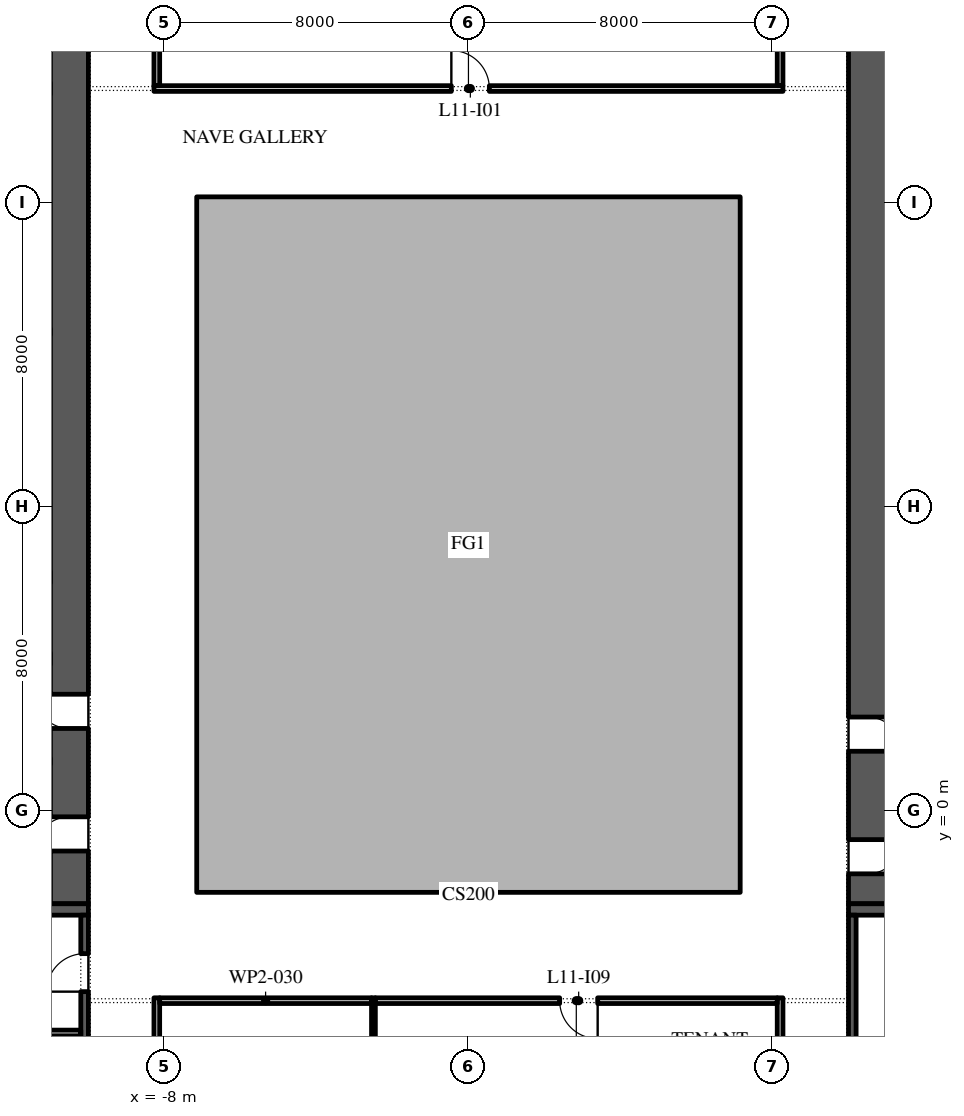
"""IFC4 building model, lengths in metres.
Left out: names, types, materials, properties, quantities, classifications, styles, units other than length and angle.
Written with IfcOpenShell. Run it as: python <this file> out.ifc"""

import sys

from ifc_helpers import new_model, si_unit, direction, frame, frame_2d, origin, place, context, subcontext, project, spatial, polyline, rectangle, outline, extrude, element, fill, save


model = new_model("IFC4")
c1 = context("Model", 3, precision=1e-05, world=origin(), true_north=direction((0.0, 1.0)))
c2 = subcontext(c1, "Body", "Model", "MODEL_VIEW")
j1 = project(units=[si_unit("LENGTHUNIT", "METRE"), si_unit("PLANEANGLEUNIT", "RADIAN")], contexts=[c1])
p1 = place(None, origin())
s1 = spatial("IfcSite", under=j1, at=p1, CompositionType="ELEMENT")
p2 = place(p1, origin())
s2 = spatial("IfcBuilding", under=s1, at=p2, CompositionType="ELEMENT")
p3 = place(p2, frame((0.0, 0.0, 56.4)))
s3 = spatial("IfcBuildingStorey", under=s2, at=p3, CompositionType="ELEMENT", Elevation=56.4)
p4 = place(p3, origin())
e1 = element("IfcWall", 1, at=p4, inside=s3, PredefinedType="STANDARD", context=c2, shape_type="SweptSolid", body=[
    extrude(outline(polyline([(-7.15, -2.15), (7.15, -2.15), (7.15, 16.15), (-7.15, 16.15), (-7.15, -2.15)]), holes=[polyline([(-7.0, -2.0), (-7.0, 16.0), (7.0, 16.0), (7.0, -2.0), (-7.0, -2.0)])]), origin(), (0.0, 0.0, 1.0), 4.0),
])
p5 = place(p3, frame((-10.5, -2.45, 0.0), z_axis=(0.0, 0.0, 1.0), x_axis=(0.0, 1.0, 0.0)))
e2 = element("IfcWall", 2, at=p5, inside=s3, PredefinedType="SHEAR", context=c2, shape_type="SweptSolid", body=[
    extrude(rectangle(XDim=27.9, YDim=1.0, at=frame_2d((13.95, 0.0))), origin(), (0.0, 0.0, 1.0), 4.0),
])
p6 = place(p5, frame((23.65, 0.0, 0.0)))
e3 = element("IfcOpeningElement", 3, at=p6, cuts=e2, PredefinedType="OPENING", context=c2, shape_type="SweptSolid", body=[
    extrude(rectangle(XDim=2.4, YDim=2.1, at=frame_2d((1.2, 1.05))), frame((0.0, 0.51, 0.0), z_axis=(0.0, -1.0, 0.0), x_axis=(1.0, 0.0, 0.0)), (0.0, 0.0, 1.0), 1.02),
])
p7 = place(p5, frame((1.387, 0.0, 0.0)))
e4 = element("IfcOpeningElement", 4, at=p7, cuts=e2, PredefinedType="OPENING", context=c2, shape_type="SweptSolid", body=[
    extrude(rectangle(XDim=0.9, YDim=2.1, at=frame_2d((0.45, 1.05))), frame((0.0, 0.51, 0.0), z_axis=(0.0, -1.0, 0.0), x_axis=(1.0, 0.0, 0.0)), (0.0, 0.0, 1.0), 1.02),
])
p8 = place(p5, frame((4.613, 0.0, 0.0)))
e5 = element("IfcOpeningElement", 5, at=p8, cuts=e2, PredefinedType="OPENING", context=c2, shape_type="SweptSolid", body=[
    extrude(rectangle(XDim=0.9, YDim=2.1, at=frame_2d((0.45, 1.05))), frame((0.0, 0.51, 0.0), z_axis=(0.0, -1.0, 0.0), x_axis=(1.0, 0.0, 0.0)), (0.0, 0.0, 1.0), 1.02),
])
p9 = place(p3, frame((-22.0, -2.6, 0.0), z_axis=(0.0, 0.0, 1.0), x_axis=(1.0, 0.0, 0.0)))
e6 = element("IfcWall", 6, at=p9, inside=s3, PredefinedType="SHEAR", context=c2, shape_type="SweptSolid", body=[
    extrude(rectangle(XDim=12.0, YDim=0.3, at=frame_2d((6.0, 0.0))), origin(), (0.0, 0.0, 1.0), 4.0),
])
p10 = place(p3, frame((-10.1, -15.8, 0.0), z_axis=(0.0, 0.0, 1.0), x_axis=(0.0, 1.0, 0.0)))
e7 = element("IfcWall", 7, at=p10, inside=s3, PredefinedType="SHEAR", context=c2, shape_type="SweptSolid", body=[
    extrude(rectangle(XDim=13.05, YDim=0.2, at=frame_2d((6.525, 0.0))), origin(), (0.0, 0.0, 1.0), 4.0),
])
p11 = place(p10, frame((4.488, 0.0, 0.0)))
e8 = element("IfcOpeningElement", 8, at=p11, cuts=e7, PredefinedType="OPENING", context=c2, shape_type="SweptSolid", body=[
    extrude(rectangle(XDim=0.9, YDim=2.1, at=frame_2d((0.45, 1.05))), frame((0.0, 0.11, 0.0), z_axis=(0.0, -1.0, 0.0), x_axis=(1.0, 0.0, 0.0)), (0.0, 0.0, 1.0), 0.22),
])
p12 = place(p10, frame((11.038, 0.0, 0.0)))
e9 = element("IfcOpeningElement", 9, at=p12, cuts=e7, PredefinedType="OPENING", context=c2, shape_type="SweptSolid", body=[
    extrude(rectangle(XDim=1.0, YDim=2.1, at=frame_2d((0.5, 1.05))), frame((0.0, 0.11, 0.0), z_axis=(0.0, -1.0, 0.0), x_axis=(1.0, 0.0, 0.0)), (0.0, 0.0, 1.0), 0.22),
])
p13 = place(p3, frame((-21.8, -5.85, 0.0), z_axis=(0.0, 0.0, 1.0), x_axis=(1.0, 0.0, 0.0)))
e10 = element("IfcWall", 10, at=p13, inside=s3, PredefinedType="PARTITIONING", context=c2, shape_type="SweptSolid", body=[
    extrude(rectangle(XDim=11.6, YDim=0.15, at=frame_2d((5.8, 0.0))), origin(), (0.0, 0.0, 1.0), 4.0),
])
p14 = place(p3, frame((10.5, -2.45, 0.0), z_axis=(0.0, 0.0, 1.0), x_axis=(0.0, 1.0, 0.0)))
e11 = element("IfcWall", 11, at=p14, inside=s3, PredefinedType="SHEAR", context=c2, shape_type="SweptSolid", body=[
    extrude(rectangle(XDim=27.9, YDim=1.0, at=frame_2d((13.95, 0.0))), origin(), (0.0, 0.0, 1.0), 4.0),
])
p15 = place(p14, frame((23.65, 0.0, 0.0)))
e12 = element("IfcOpeningElement", 12, at=p15, cuts=e11, PredefinedType="OPENING", context=c2, shape_type="SweptSolid", body=[
    extrude(rectangle(XDim=2.4, YDim=2.1, at=frame_2d((1.2, 1.05))), frame((0.0, 0.51, 0.0), z_axis=(0.0, -1.0, 0.0), x_axis=(1.0, 0.0, 0.0)), (0.0, 0.0, 1.0), 1.02),
])
p16 = place(p14, frame((0.788, 0.0, 0.0)))
e13 = element("IfcOpeningElement", 13, at=p16, cuts=e11, PredefinedType="OPENING", context=c2, shape_type="SweptSolid", body=[
    extrude(rectangle(XDim=0.9, YDim=2.1, at=frame_2d((0.45, 1.05))), frame((0.0, 0.51, 0.0), z_axis=(0.0, -1.0, 0.0), x_axis=(1.0, 0.0, 0.0)), (0.0, 0.0, 1.0), 1.02),
])
p17 = place(p14, frame((4.012, 0.0, 0.0)))
e14 = element("IfcOpeningElement", 14, at=p17, cuts=e11, PredefinedType="OPENING", context=c2, shape_type="SweptSolid", body=[
    extrude(rectangle(XDim=0.9, YDim=2.1, at=frame_2d((0.45, 1.05))), frame((0.0, 0.51, 0.0), z_axis=(0.0, -1.0, 0.0), x_axis=(1.0, 0.0, 0.0)), (0.0, 0.0, 1.0), 1.02),
])
p18 = place(p3, frame((10.0, -2.6, 0.0), z_axis=(0.0, 0.0, 1.0), x_axis=(1.0, 0.0, 0.0)))
e15 = element("IfcWall", 15, at=p18, inside=s3, PredefinedType="SHEAR", context=c2, shape_type="SweptSolid", body=[
    extrude(rectangle(XDim=12.0, YDim=0.3, at=frame_2d((6.0, 0.0))), origin(), (0.0, 0.0, 1.0), 4.0),
])
p19 = place(p3, frame((10.1, -15.8, 0.0), z_axis=(0.0, 0.0, 1.0), x_axis=(0.0, 1.0, 0.0)))
e16 = element("IfcWall", 16, at=p19, inside=s3, PredefinedType="SHEAR", context=c2, shape_type="SweptSolid", body=[
    extrude(rectangle(XDim=13.05, YDim=0.2, at=frame_2d((6.525, 0.0))), origin(), (0.0, 0.0, 1.0), 4.0),
])
p20 = place(p19, frame((6.075, 0.0, 0.0)))
e17 = element("IfcOpeningElement", 17, at=p20, cuts=e16, PredefinedType="OPENING", context=c2, shape_type="SweptSolid", body=[
    extrude(rectangle(XDim=0.9, YDim=2.1, at=frame_2d((0.45, 1.05))), frame((0.0, 0.11, 0.0), z_axis=(0.0, -1.0, 0.0), x_axis=(1.0, 0.0, 0.0)), (0.0, 0.0, 1.0), 0.22),
])
p21 = place(p3, frame((-8.2, -4.925, 0.0), z_axis=(0.0, 0.0, 1.0), x_axis=(0.0, -1.0, 0.0)))
e18 = element("IfcWall", 18, at=p21, inside=s3, PredefinedType="PARTITIONING", context=c2, shape_type="SweptSolid", body=[
    extrude(rectangle(XDim=12.415, YDim=0.15, at=frame_2d((6.208, 0.0))), origin(), (0.0, 0.0, 1.0), 4.0),
])
p22 = place(p21, frame((5.715, 0.0, 0.0)))
e19 = element("IfcOpeningElement", 19, at=p22, cuts=e18, PredefinedType="OPENING", context=c2, shape_type="SweptSolid", body=[
    extrude(rectangle(XDim=1.0, YDim=2.1, at=frame_2d((0.5, 1.05))), frame((0.0, 0.085, 0.0), z_axis=(0.0, -1.0, 0.0), x_axis=(1.0, 0.0, 0.0)), (0.0, 0.0, 1.0), 0.17),
])
p23 = place(p3, frame((-8.275, 19.0, 0.0), z_axis=(0.0, 0.0, 1.0), x_axis=(1.0, 0.0, 0.0)))
e20 = element("IfcWall", 20, at=p23, inside=s3, PredefinedType="PARTITIONING", context=c2, shape_type="SweptSolid", body=[
    extrude(rectangle(XDim=16.55, YDim=0.15, at=frame_2d((8.275, 0.0))), origin(), (0.0, 0.0, 1.0), 4.0),
])
p24 = place(p23, frame((7.825, 0.0, 0.0)))
e21 = element("IfcOpeningElement", 21, at=p24, cuts=e20, PredefinedType="OPENING", context=c2, shape_type="SweptSolid", body=[
    extrude(rectangle(XDim=1.0, YDim=2.1, at=frame_2d((0.5, 1.05))), frame((0.0, 0.085, 0.0), z_axis=(0.0, -1.0, 0.0), x_axis=(1.0, 0.0, 0.0)), (0.0, 0.0, 1.0), 0.17),
])
p25 = place(p3, frame((-8.2, 25.45, 0.0), z_axis=(0.0, 0.0, 1.0), x_axis=(0.0, -1.0, 0.0)))
e22 = element("IfcWall", 22, at=p25, inside=s3, PredefinedType="PARTITIONING", context=c2, shape_type="SweptSolid", body=[
    extrude(rectangle(XDim=6.375, YDim=0.15, at=frame_2d((3.188, 0.0))), origin(), (0.0, 0.0, 1.0), 4.0),
])
p26 = place(p3, frame((-2.5, -8.45, 0.0), z_axis=(0.0, 0.0, 1.0), x_axis=(0.0, 1.0, 0.0)))
e23 = element("IfcWall", 23, at=p26, inside=s3, PredefinedType="PARTITIONING", context=c2, shape_type="SweptSolid", body=[
    extrude(rectangle(XDim=3.525, YDim=0.1, at=frame_2d((1.762, 0.0))), origin(), (0.0, 0.0, 1.0), 4.0),
])
p27 = place(p3, frame((-2.55, -5.0, 0.0), z_axis=(0.0, 0.0, 1.0), x_axis=(-1.0, 0.0, 0.0)))
e24 = element("IfcWall", 24, at=p27, inside=s3, PredefinedType="PARTITIONING", context=c2, shape_type="SweptSolid", body=[
    extrude(rectangle(XDim=5.575, YDim=0.15, at=frame_2d((2.788, 0.0))), origin(), (0.0, 0.0, 1.0), 4.0),
])
p28 = place(p3, frame((8.2, -8.45, 0.0), z_axis=(0.0, 0.0, 1.0), x_axis=(0.0, 1.0, 0.0)))
e25 = element("IfcWall", 25, at=p28, inside=s3, PredefinedType="PARTITIONING", context=c2, shape_type="SweptSolid", body=[
    extrude(rectangle(XDim=3.525, YDim=0.15, at=frame_2d((1.762, 0.0))), origin(), (0.0, 0.0, 1.0), 4.0),
])
p29 = place(p3, frame((8.125, -5.0, 0.0), z_axis=(0.0, 0.0, 1.0), x_axis=(-1.0, 0.0, 0.0)))
e26 = element("IfcWall", 26, at=p29, inside=s3, PredefinedType="PARTITIONING", context=c2, shape_type="SweptSolid", body=[
    extrude(rectangle(XDim=10.575, YDim=0.15, at=frame_2d((5.288, 0.0))), origin(), (0.0, 0.0, 1.0), 4.0),
])
p30 = place(p29, frame((4.725, 0.0, 0.0)))
e27 = element("IfcOpeningElement", 27, at=p30, cuts=e26, PredefinedType="OPENING", context=c2, shape_type="SweptSolid", body=[
    extrude(rectangle(XDim=1.0, YDim=2.1, at=frame_2d((0.5, 1.05))), frame((0.0, 0.085, 0.0), z_axis=(0.0, -1.0, 0.0), x_axis=(1.0, 0.0, 0.0)), (0.0, 0.0, 1.0), 0.17),
])
p31 = place(p3, frame((8.2, 19.075, 0.0), z_axis=(0.0, 0.0, 1.0), x_axis=(0.0, 1.0, 0.0)))
e28 = element("IfcWall", 28, at=p31, inside=s3, PredefinedType="PARTITIONING", context=c2, shape_type="SweptSolid", body=[
    extrude(rectangle(XDim=6.275, YDim=0.15, at=frame_2d((3.138, 0.0))), origin(), (0.0, 0.0, 1.0), 4.0),
])
p32 = place(p12, origin())
e29 = element("IfcDoor", 29, at=p32, inside=s3, OperationType="SINGLE_SWING_RIGHT", PredefinedType="DOOR", context=c2, shape_type="SweptSolid", body=[
    extrude(rectangle(XDim=1.0, YDim=2.1, at=frame_2d((0.5, 1.05))), frame((0.0, 0.1, 0.0), z_axis=(0.0, -1.0, 0.0), x_axis=(1.0, 0.0, 0.0)), (0.0, 0.0, 1.0), 0.05),
])
fill(e9, e29)
p33 = place(p24, origin())
e30 = element("IfcDoor", 30, at=p33, inside=s3, OperationType="SINGLE_SWING_RIGHT", PredefinedType="DOOR", context=c2, shape_type="SweptSolid", body=[
    extrude(rectangle(XDim=1.0, YDim=2.1, at=frame_2d((0.5, 1.05))), frame((0.0, 0.025, 0.0), z_axis=(0.0, -1.0, 0.0), x_axis=(1.0, 0.0, 0.0)), (0.0, 0.0, 1.0), 0.05),
])
fill(e21, e30)
p34 = place(p30, origin())
e31 = element("IfcDoor", 31, at=p34, inside=s3, OperationType="SINGLE_SWING_RIGHT", PredefinedType="DOOR", context=c2, shape_type="SweptSolid", body=[
    extrude(rectangle(XDim=1.0, YDim=2.1, at=frame_2d((0.5, 1.05))), frame((0.0, 0.025, 0.0), z_axis=(0.0, -1.0, 0.0), x_axis=(1.0, 0.0, 0.0)), (0.0, 0.0, 1.0), 0.05),
])
fill(e27, e31)
save(model, sys.argv[1])
